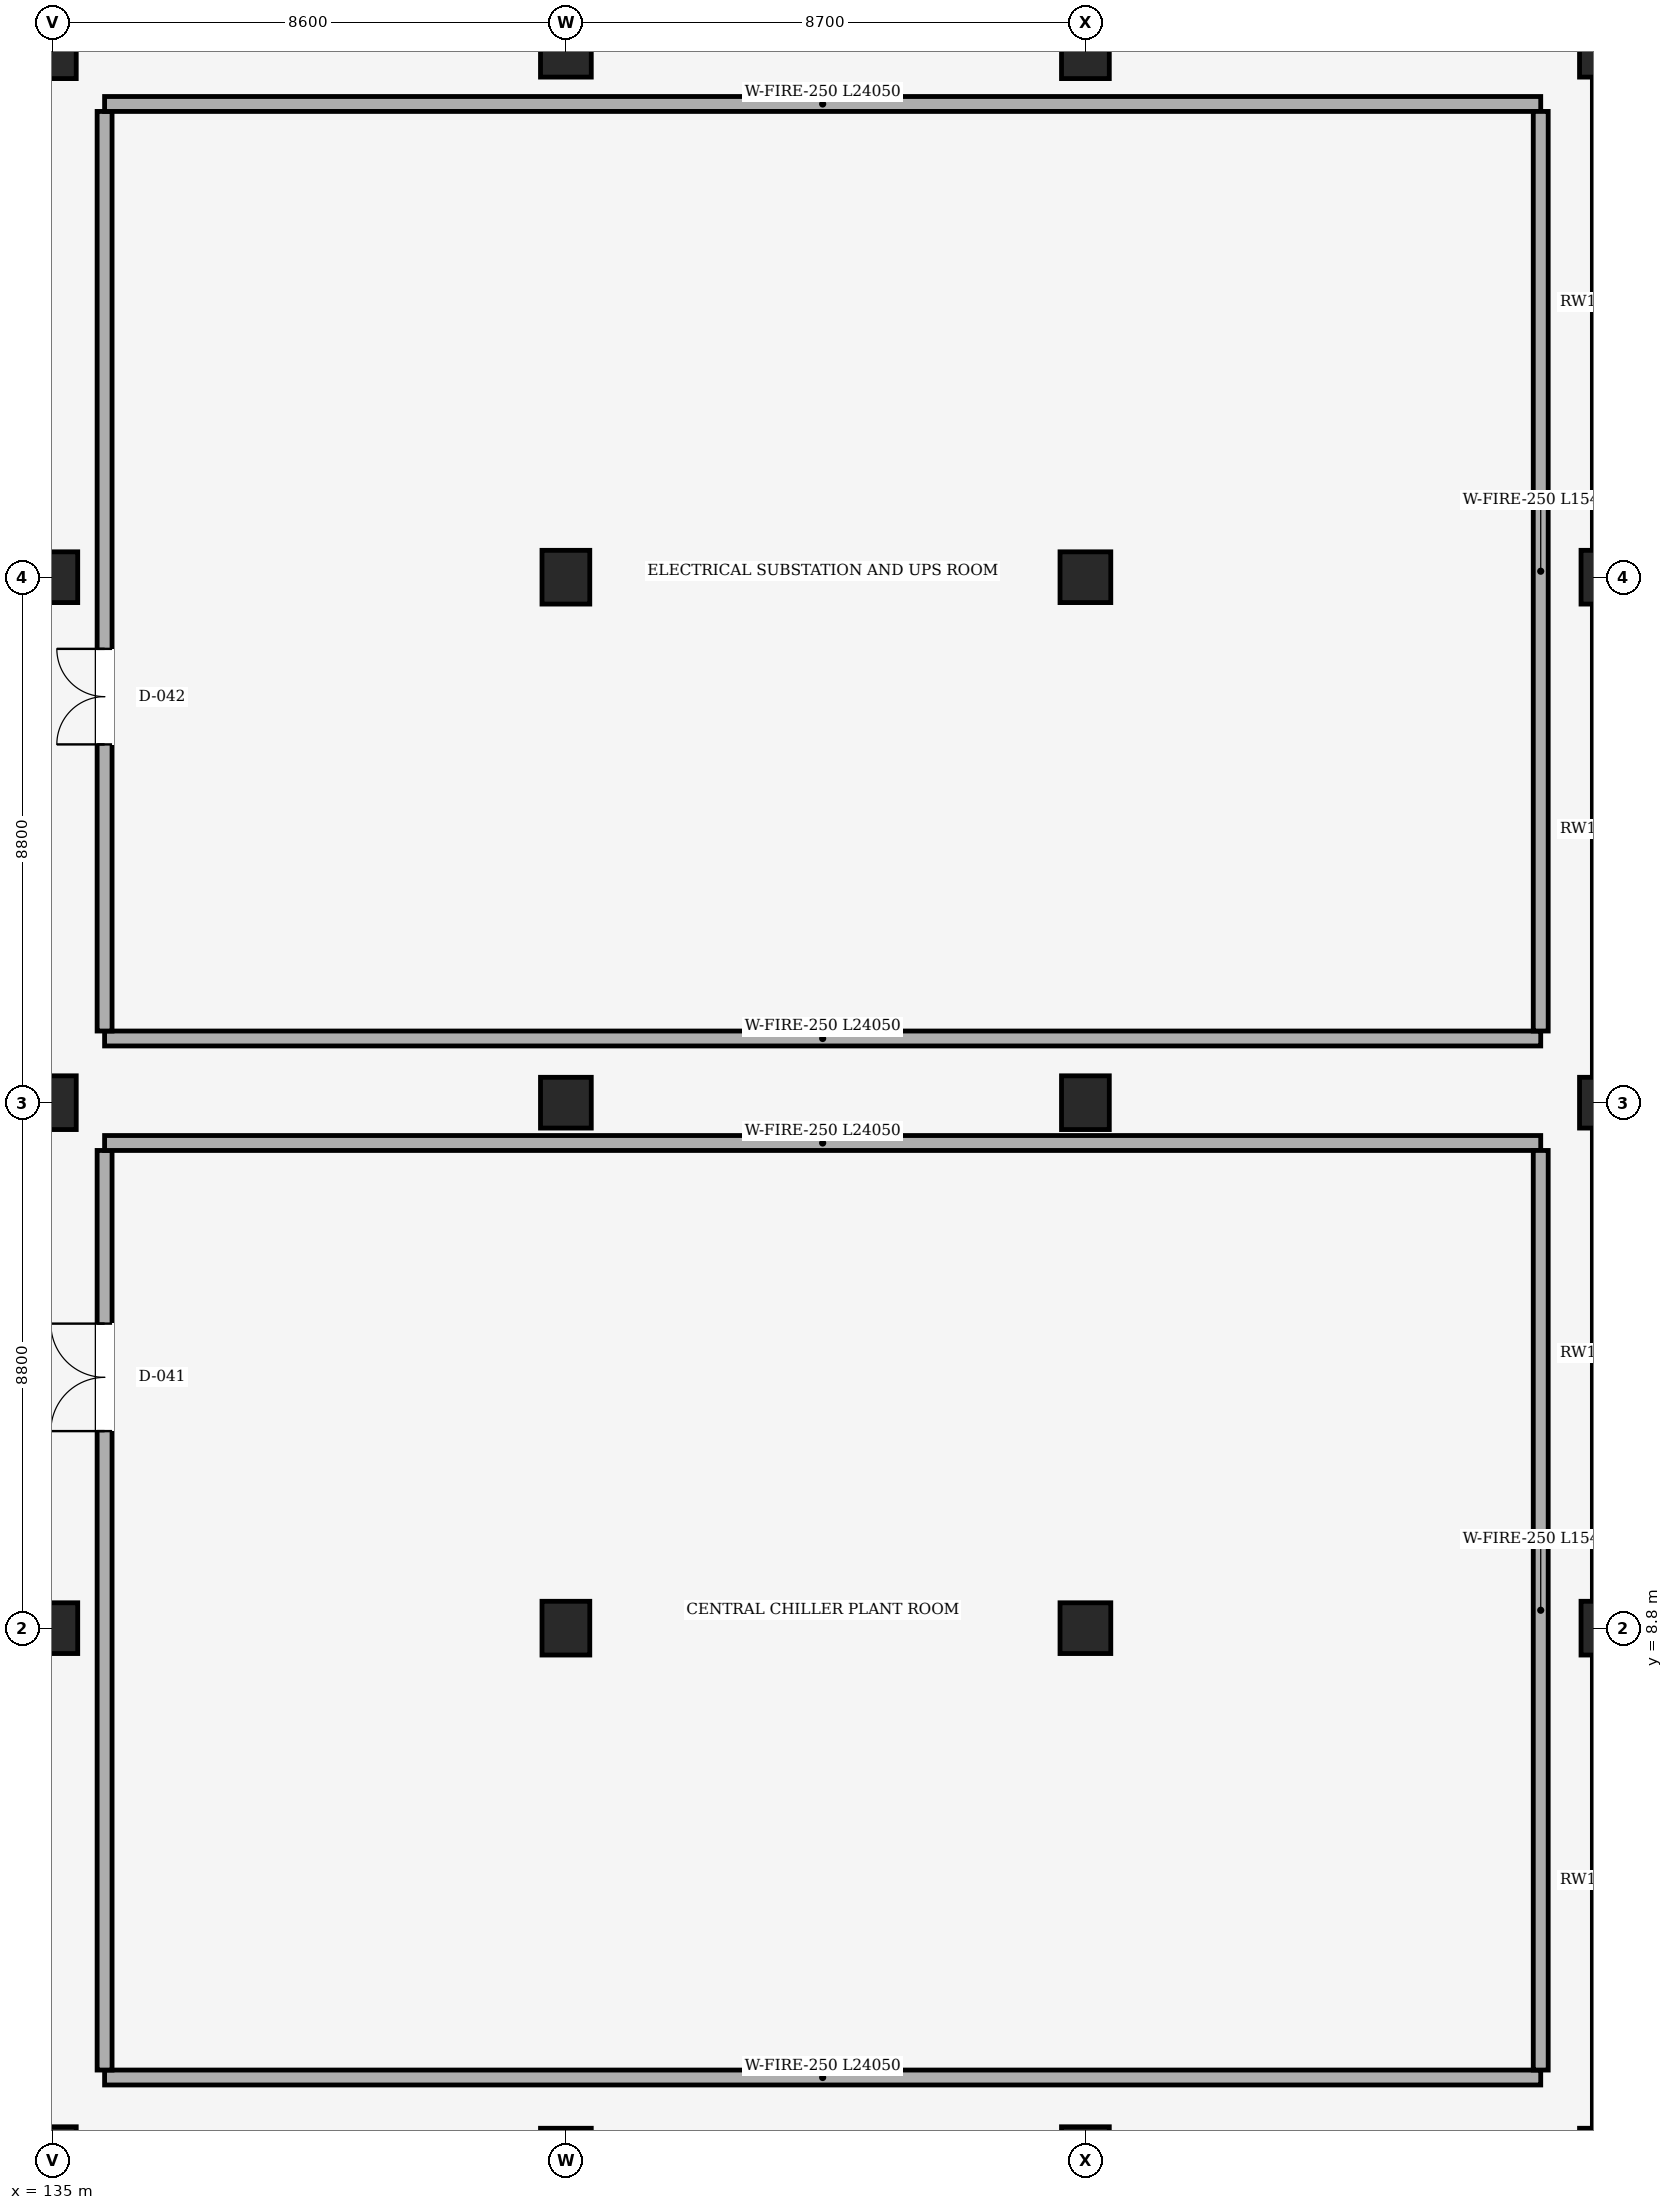
"""IFC4 building model, lengths in metres.
Left out: names, types, materials, properties, quantities, classifications, styles, units other than length and angle.
Written with IfcOpenShell. Run it as: python <this file> out.ifc"""

import sys

from ifc_helpers import new_model, si_unit, direction, frame, frame_2d, origin, origin_2d, place, context, subcontext, project, spatial, rectangle, extrude, element, fill, save


model = new_model("IFC4")
c1 = context("Model", 3, precision=1e-05, world=origin(), true_north=direction((0.0, 1.0)))
c2 = subcontext(c1, "Body", "Model", "MODEL_VIEW")
j1 = project(units=[si_unit("LENGTHUNIT", "METRE"), si_unit("PLANEANGLEUNIT", "RADIAN")], contexts=[c1])
p1 = place(None, origin())
s1 = spatial("IfcSite", under=j1, at=p1, CompositionType="ELEMENT")
p2 = place(p1, origin())
s2 = spatial("IfcBuilding", under=s1, at=p2, CompositionType="ELEMENT")
p3 = place(p2, frame((0.0, 0.0, -4.2)))
s3 = spatial("IfcBuildingStorey", under=s2, at=p3, CompositionType="ELEMENT", Elevation=-4.2)
p4 = place(p3, frame((135.0, 0.0, 0.0), z_axis=(0.0, 0.0, 1.0), x_axis=(1.0, 0.0, 0.0)))
e1 = element("IfcColumn", 1, at=p4, inside=s3, PredefinedType="COLUMN", context=c2, shape_type="SweptSolid", body=[
    extrude(rectangle(XDim=0.8, YDim=0.9, at=origin_2d()), origin(), (0.0, 0.0, 1.0), 3.92),
])
p5 = place(p3, frame((135.0, 8.8, 0.0), z_axis=(0.0, 0.0, 1.0), x_axis=(1.0, 0.0, 0.0)))
e2 = element("IfcColumn", 2, at=p5, inside=s3, PredefinedType="COLUMN", context=c2, shape_type="SweptSolid", body=[
    extrude(rectangle(XDim=0.85, YDim=0.85, at=origin_2d()), origin(), (0.0, 0.0, 1.0), 3.92),
])
p6 = place(p3, frame((135.0, 17.6, 0.0), z_axis=(0.0, 0.0, 1.0), x_axis=(1.0, 0.0, 0.0)))
e3 = element("IfcColumn", 3, at=p6, inside=s3, PredefinedType="COLUMN", context=c2, shape_type="SweptSolid", body=[
    extrude(rectangle(XDim=0.8, YDim=0.9, at=origin_2d()), origin(), (0.0, 0.0, 1.0), 3.92),
])
p7 = place(p3, frame((135.0, 26.4, 0.0), z_axis=(0.0, 0.0, 1.0), x_axis=(1.0, 0.0, 0.0)))
e4 = element("IfcColumn", 4, at=p7, inside=s3, PredefinedType="COLUMN", context=c2, shape_type="SweptSolid", body=[
    extrude(rectangle(XDim=0.85, YDim=0.85, at=origin_2d()), origin(), (0.0, 0.0, 1.0), 3.92),
])
p8 = place(p3, frame((135.0, 35.2, 0.0), z_axis=(0.0, 0.0, 1.0), x_axis=(1.0, 0.0, 0.0)))
e5 = element("IfcColumn", 5, at=p8, inside=s3, PredefinedType="COLUMN", context=c2, shape_type="SweptSolid", body=[
    extrude(rectangle(XDim=0.8, YDim=0.9, at=origin_2d()), origin(), (0.0, 0.0, 1.0), 3.92),
])
p9 = place(p3, frame((143.6, 0.0, 0.0), z_axis=(0.0, 0.0, 1.0), x_axis=(1.0, 0.0, 0.0)))
e6 = element("IfcColumn", 6, at=p9, inside=s3, PredefinedType="COLUMN", context=c2, shape_type="SweptSolid", body=[
    extrude(rectangle(XDim=0.85, YDim=0.85, at=origin_2d()), origin(), (0.0, 0.0, 1.0), 3.92),
])
p10 = place(p3, frame((143.6, 8.8, 0.0), z_axis=(0.0, 0.0, 1.0), x_axis=(1.0, 0.0, 0.0)))
e7 = element("IfcColumn", 7, at=p10, inside=s3, PredefinedType="COLUMN", context=c2, shape_type="SweptSolid", body=[
    extrude(rectangle(XDim=0.8, YDim=0.9, at=origin_2d()), origin(), (0.0, 0.0, 1.0), 3.92),
])
p11 = place(p3, frame((143.6, 17.6, 0.0), z_axis=(0.0, 0.0, 1.0), x_axis=(1.0, 0.0, 0.0)))
e8 = element("IfcColumn", 8, at=p11, inside=s3, PredefinedType="COLUMN", context=c2, shape_type="SweptSolid", body=[
    extrude(rectangle(XDim=0.85, YDim=0.85, at=origin_2d()), origin(), (0.0, 0.0, 1.0), 3.92),
])
p12 = place(p3, frame((143.6, 26.4, 0.0), z_axis=(0.0, 0.0, 1.0), x_axis=(1.0, 0.0, 0.0)))
e9 = element("IfcColumn", 9, at=p12, inside=s3, PredefinedType="COLUMN", context=c2, shape_type="SweptSolid", body=[
    extrude(rectangle(XDim=0.8, YDim=0.9, at=origin_2d()), origin(), (0.0, 0.0, 1.0), 3.92),
])
p13 = place(p3, frame((143.6, 35.2, 0.0), z_axis=(0.0, 0.0, 1.0), x_axis=(1.0, 0.0, 0.0)))
e10 = element("IfcColumn", 10, at=p13, inside=s3, PredefinedType="COLUMN", context=c2, shape_type="SweptSolid", body=[
    extrude(rectangle(XDim=0.85, YDim=0.85, at=origin_2d()), origin(), (0.0, 0.0, 1.0), 3.92),
])
p14 = place(p3, frame((152.3, 0.0, 0.0), z_axis=(0.0, 0.0, 1.0), x_axis=(1.0, 0.0, 0.0)))
e11 = element("IfcColumn", 11, at=p14, inside=s3, PredefinedType="COLUMN", context=c2, shape_type="SweptSolid", body=[
    extrude(rectangle(XDim=0.8, YDim=0.9, at=origin_2d()), origin(), (0.0, 0.0, 1.0), 3.92),
])
p15 = place(p3, frame((152.3, 8.8, 0.0), z_axis=(0.0, 0.0, 1.0), x_axis=(1.0, 0.0, 0.0)))
e12 = element("IfcColumn", 12, at=p15, inside=s3, PredefinedType="COLUMN", context=c2, shape_type="SweptSolid", body=[
    extrude(rectangle(XDim=0.85, YDim=0.85, at=origin_2d()), origin(), (0.0, 0.0, 1.0), 3.92),
])
p16 = place(p3, frame((152.3, 17.6, 0.0), z_axis=(0.0, 0.0, 1.0), x_axis=(1.0, 0.0, 0.0)))
e13 = element("IfcColumn", 13, at=p16, inside=s3, PredefinedType="COLUMN", context=c2, shape_type="SweptSolid", body=[
    extrude(rectangle(XDim=0.8, YDim=0.9, at=origin_2d()), origin(), (0.0, 0.0, 1.0), 3.92),
])
p17 = place(p3, frame((152.3, 26.4, 0.0), z_axis=(0.0, 0.0, 1.0), x_axis=(1.0, 0.0, 0.0)))
e14 = element("IfcColumn", 14, at=p17, inside=s3, PredefinedType="COLUMN", context=c2, shape_type="SweptSolid", body=[
    extrude(rectangle(XDim=0.85, YDim=0.85, at=origin_2d()), origin(), (0.0, 0.0, 1.0), 3.92),
])
p18 = place(p3, frame((152.3, 35.2, 0.0), z_axis=(0.0, 0.0, 1.0), x_axis=(1.0, 0.0, 0.0)))
e15 = element("IfcColumn", 15, at=p18, inside=s3, PredefinedType="COLUMN", context=c2, shape_type="SweptSolid", body=[
    extrude(rectangle(XDim=0.8, YDim=0.9, at=origin_2d()), origin(), (0.0, 0.0, 1.0), 3.92),
])
p19 = place(p3, frame((161.0, 0.0, 0.0), z_axis=(0.0, 0.0, 1.0), x_axis=(1.0, 0.0, 0.0)))
e16 = element("IfcColumn", 16, at=p19, inside=s3, PredefinedType="COLUMN", context=c2, shape_type="SweptSolid", body=[
    extrude(rectangle(XDim=0.85, YDim=0.85, at=origin_2d()), origin(), (0.0, 0.0, 1.0), 3.92),
])
p20 = place(p3, frame((161.0, 8.8, 0.0), z_axis=(0.0, 0.0, 1.0), x_axis=(1.0, 0.0, 0.0)))
e17 = element("IfcColumn", 17, at=p20, inside=s3, PredefinedType="COLUMN", context=c2, shape_type="SweptSolid", body=[
    extrude(rectangle(XDim=0.8, YDim=0.9, at=origin_2d()), origin(), (0.0, 0.0, 1.0), 3.92),
])
p21 = place(p3, frame((161.0, 17.6, 0.0), z_axis=(0.0, 0.0, 1.0), x_axis=(1.0, 0.0, 0.0)))
e18 = element("IfcColumn", 18, at=p21, inside=s3, PredefinedType="COLUMN", context=c2, shape_type="SweptSolid", body=[
    extrude(rectangle(XDim=0.85, YDim=0.85, at=origin_2d()), origin(), (0.0, 0.0, 1.0), 3.92),
])
p22 = place(p3, frame((161.0, 26.4, 0.0), z_axis=(0.0, 0.0, 1.0), x_axis=(1.0, 0.0, 0.0)))
e19 = element("IfcColumn", 19, at=p22, inside=s3, PredefinedType="COLUMN", context=c2, shape_type="SweptSolid", body=[
    extrude(rectangle(XDim=0.8, YDim=0.9, at=origin_2d()), origin(), (0.0, 0.0, 1.0), 3.92),
])
p23 = place(p3, frame((161.0, 35.2, 0.0), z_axis=(0.0, 0.0, 1.0), x_axis=(1.0, 0.0, 0.0)))
e20 = element("IfcColumn", 20, at=p23, inside=s3, PredefinedType="COLUMN", context=c2, shape_type="SweptSolid", body=[
    extrude(rectangle(XDim=0.85, YDim=0.85, at=origin_2d()), origin(), (0.0, 0.0, 1.0), 3.92),
])
p24 = place(p3, frame((161.0, 34.775, 0.0), z_axis=(0.0, 0.0, 1.0), x_axis=(0.0, -1.0, 0.0)))
e21 = element("IfcWall", 21, at=p24, inside=s3, PredefinedType="USERDEFINED", context=c2, shape_type="SweptSolid", body=[
    extrude(rectangle(XDim=7.925, YDim=0.42, at=frame_2d((3.962, 0.0))), origin(), (0.0, 0.0, 1.0), 3.32),
])
for number, where, z_axis, x_axis in (
    (22, (161.0, 25.95, 0.0), (0.0, 0.0, 1.0), (0.0, -1.0, 0.0)),
    (23, (161.0, 17.175, 0.0), (0.0, 0.0, 1.0), (0.0, -1.0, 0.0)),
    (24, (161.0, 8.35, 0.0), (0.0, 0.0, 1.0), (0.0, -1.0, 0.0)),
):
    element("IfcWall", number, at=place(p3, frame(where, z_axis=z_axis, x_axis=x_axis)), inside=s3, PredefinedType="USERDEFINED", context=c2, shape_type="SweptSolid", body=[
        extrude(rectangle(XDim=7.925, YDim=0.42, at=frame_2d((3.962, 0.0))), origin(), (0.0, 0.0, 1.0), 3.32),
    ])
p25 = place(p3, frame((159.925, 1.275, 0.0), z_axis=(0.0, 0.0, 1.0), x_axis=(-1.0, 0.0, 0.0)))
e25 = element("IfcWall", 25, at=p25, inside=s3, PredefinedType="SOLIDWALL", context=c2, shape_type="SweptSolid", body=[
    extrude(rectangle(XDim=24.05, YDim=0.25, at=frame_2d((12.025, 0.0))), origin(), (0.0, 0.0, 1.0), 3.9),
])
p26 = place(p3, frame((135.875, 1.4, 0.0), z_axis=(0.0, 0.0, 1.0), x_axis=(0.0, 1.0, 0.0)))
e26 = element("IfcWall", 26, at=p26, inside=s3, PredefinedType="SOLIDWALL", context=c2, shape_type="SweptSolid", body=[
    extrude(rectangle(XDim=15.4, YDim=0.25, at=frame_2d((7.7, 0.0))), origin(), (0.0, 0.0, 1.0), 3.9),
])
p27 = place(p26, frame((10.7, 0.0, 0.0)))
e27 = element("IfcOpeningElement", 27, at=p27, cuts=e26, PredefinedType="OPENING", context=c2, shape_type="SweptSolid", body=[
    extrude(rectangle(XDim=1.8, YDim=2.35, at=frame_2d((0.9, 1.175))), frame((0.0, 0.125, 0.0), z_axis=(0.0, -1.0, 0.0), x_axis=(1.0, 0.0, 0.0)), (0.0, 0.0, 1.0), 0.25),
])
p28 = place(p3, frame((135.875, 16.925, 0.0), z_axis=(0.0, 0.0, 1.0), x_axis=(1.0, 0.0, 0.0)))
e28 = element("IfcWall", 28, at=p28, inside=s3, PredefinedType="SOLIDWALL", context=c2, shape_type="SweptSolid", body=[
    extrude(rectangle(XDim=24.05, YDim=0.25, at=frame_2d((12.025, 0.0))), origin(), (0.0, 0.0, 1.0), 3.9),
])
p29 = place(p3, frame((159.925, 16.8, 0.0), z_axis=(0.0, 0.0, 1.0), x_axis=(0.0, -1.0, 0.0)))
e29 = element("IfcWall", 29, at=p29, inside=s3, PredefinedType="SOLIDWALL", context=c2, shape_type="SweptSolid", body=[
    extrude(rectangle(XDim=15.4, YDim=0.25, at=frame_2d((7.7, 0.0))), origin(), (0.0, 0.0, 1.0), 3.9),
])
p30 = place(p3, frame((159.925, 18.675, 0.0), z_axis=(0.0, 0.0, 1.0), x_axis=(-1.0, 0.0, 0.0)))
e30 = element("IfcWall", 30, at=p30, inside=s3, PredefinedType="SOLIDWALL", context=c2, shape_type="SweptSolid", body=[
    extrude(rectangle(XDim=24.05, YDim=0.25, at=frame_2d((12.025, 0.0))), origin(), (0.0, 0.0, 1.0), 3.9),
])
p31 = place(p3, frame((135.875, 18.8, 0.0), z_axis=(0.0, 0.0, 1.0), x_axis=(0.0, 1.0, 0.0)))
e31 = element("IfcWall", 31, at=p31, inside=s3, PredefinedType="SOLIDWALL", context=c2, shape_type="SweptSolid", body=[
    extrude(rectangle(XDim=15.4, YDim=0.25, at=frame_2d((7.7, 0.0))), origin(), (0.0, 0.0, 1.0), 3.9),
])
p32 = place(p31, frame((4.8, 0.0, 0.0)))
e32 = element("IfcOpeningElement", 32, at=p32, cuts=e31, PredefinedType="OPENING", context=c2, shape_type="SweptSolid", body=[
    extrude(rectangle(XDim=1.6, YDim=2.3, at=frame_2d((0.8, 1.15))), frame((0.0, 0.125, 0.0), z_axis=(0.0, -1.0, 0.0), x_axis=(1.0, 0.0, 0.0)), (0.0, 0.0, 1.0), 0.25),
])
p33 = place(p3, frame((135.875, 34.325, 0.0), z_axis=(0.0, 0.0, 1.0), x_axis=(1.0, 0.0, 0.0)))
e33 = element("IfcWall", 33, at=p33, inside=s3, PredefinedType="SOLIDWALL", context=c2, shape_type="SweptSolid", body=[
    extrude(rectangle(XDim=24.05, YDim=0.25, at=frame_2d((12.025, 0.0))), origin(), (0.0, 0.0, 1.0), 3.9),
])
p34 = place(p3, frame((159.925, 34.2, 0.0), z_axis=(0.0, 0.0, 1.0), x_axis=(0.0, -1.0, 0.0)))
e34 = element("IfcWall", 34, at=p34, inside=s3, PredefinedType="SOLIDWALL", context=c2, shape_type="SweptSolid", body=[
    extrude(rectangle(XDim=15.4, YDim=0.25, at=frame_2d((7.7, 0.0))), origin(), (0.0, 0.0, 1.0), 3.9),
])
p35 = place(p27, origin())
e35 = element("IfcDoor", 35, at=p35, inside=s3, OperationType="DOUBLE_DOOR_SINGLE_SWING", PredefinedType="DOOR", context=c2, shape_type="SweptSolid", body=[
    extrude(rectangle(XDim=1.8, YDim=2.35, at=frame_2d((0.9, 1.175))), frame((0.0, 0.025, 0.0), z_axis=(0.0, -1.0, 0.0), x_axis=(1.0, 0.0, 0.0)), (0.0, 0.0, 1.0), 0.05),
])
fill(e27, e35)
p36 = place(p32, origin())
e36 = element("IfcDoor", 36, at=p36, inside=s3, OperationType="DOUBLE_DOOR_SINGLE_SWING", PredefinedType="DOOR", context=c2, shape_type="SweptSolid", body=[
    extrude(rectangle(XDim=1.6, YDim=2.3, at=frame_2d((0.8, 1.15))), frame((0.0, 0.025, 0.0), z_axis=(0.0, -1.0, 0.0), x_axis=(1.0, 0.0, 0.0)), (0.0, 0.0, 1.0), 0.05),
])
fill(e32, e36)
save(model, sys.argv[1])
